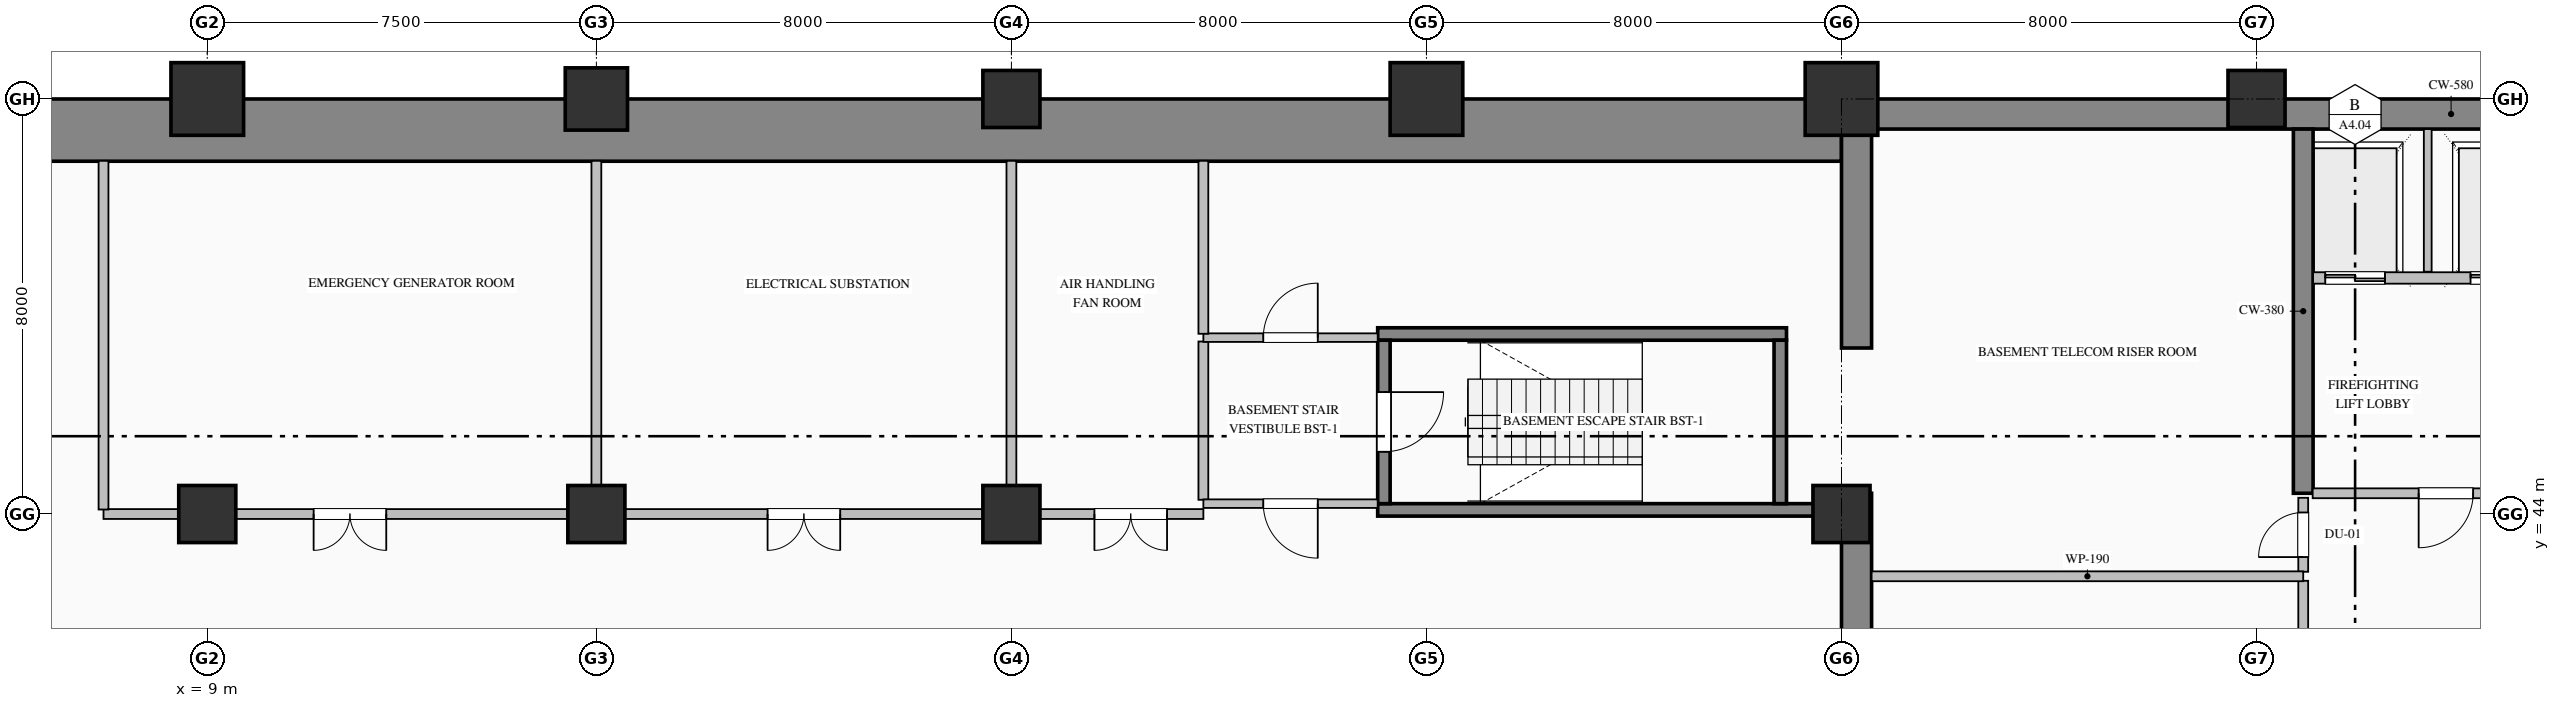
"""IFC4 building model, lengths in metres.
Left out: names, types, materials, properties, quantities, classifications, styles, units other than length and angle.
Written with IfcOpenShell. Run it as: python <this file> out.ifc"""

import sys

from ifc_helpers import new_model, si_unit, direction, frame, frame_2d, origin, origin_2d, place, context, subcontext, project, spatial, rectangle, hollow_rectangle, hollow_circle, extrude, element, fill, save


model = new_model("IFC4")
c1 = context("Model", 3, precision=1e-05, world=origin(), true_north=direction((0.0, 1.0)))
c2 = subcontext(c1, "Body", "Model", "MODEL_VIEW")
j1 = project(units=[si_unit("LENGTHUNIT", "METRE"), si_unit("PLANEANGLEUNIT", "RADIAN")], contexts=[c1])
p1 = place(None, origin())
s1 = spatial("IfcSite", under=j1, at=p1, CompositionType="ELEMENT")
p2 = place(p1, origin())
s2 = spatial("IfcBuilding", under=s1, at=p2, CompositionType="ELEMENT")
p3 = place(p2, frame((0.0, 0.0, -9.2)))
s3 = spatial("IfcBuildingStorey", under=s2, at=p3, CompositionType="ELEMENT", Elevation=-9.2)
p4 = place(p3, frame((-1.2, 51.4, 0.0), z_axis=(0.0, 0.0, 1.0), x_axis=(1.0, 0.0, 0.0)))
e1 = element("IfcWall", 1, at=p4, inside=s3, PredefinedType="USERDEFINED", context=c2, shape_type="SweptSolid", body=[
    extrude(rectangle(XDim=41.7, YDim=1.2, at=frame_2d((20.85, 0.0))), origin(), (0.0, 0.0, 1.0), 4.6),
])
p5 = place(p3, frame((40.5, 51.71, 0.0), z_axis=(0.0, 0.0, 1.0), x_axis=(1.0, 0.0, 0.0)))
e2 = element("IfcWall", 2, at=p5, inside=s3, PredefinedType="SHEAR", context=c2, shape_type="SweptSolid", body=[
    extrude(rectangle(XDim=23.5, YDim=0.58, at=frame_2d((11.75, 0.0))), origin(), (0.0, 0.0, 1.0), 4.24),
])
p6 = place(p3, frame((40.79, 36.58, 0.0), z_axis=(0.0, 0.0, 1.0), x_axis=(0.0, 1.0, 0.0)))
e3 = element("IfcWall", 3, at=p6, inside=s3, PredefinedType="SHEAR", context=c2, shape_type="SweptSolid", body=[
    extrude(rectangle(XDim=7.82, YDim=0.58, at=frame_2d((3.91, 0.0))), origin(), (0.0, 0.0, 1.0), 4.24),
])
p7 = place(p3, frame((40.79, 47.2, 0.0), z_axis=(0.0, 0.0, 1.0), x_axis=(0.0, 1.0, 0.0)))
e4 = element("IfcWall", 4, at=p7, inside=s3, PredefinedType="SHEAR", context=c2, shape_type="SweptSolid", body=[
    extrude(rectangle(XDim=4.22, YDim=0.58, at=frame_2d((2.11, 0.0))), origin(), (0.0, 0.0, 1.0), 4.24),
])
p8 = place(p3, frame((49.4, 44.4, 0.0), z_axis=(0.0, 0.0, 1.0), x_axis=(0.0, 1.0, 0.0)))
e5 = element("IfcWall", 5, at=p8, inside=s3, PredefinedType="SHEAR", context=c2, shape_type="SweptSolid", body=[
    extrude(rectangle(XDim=7.02, YDim=0.38, at=frame_2d((3.51, 0.0))), origin(), (0.0, 0.0, 1.0), 4.24),
])
p9 = place(p3, frame((9.0, 44.0, 0.0), z_axis=(0.0, 0.0, 1.0), x_axis=(1.0, 0.0, 0.0)))
e6 = element("IfcColumn", 6, at=p9, inside=s3, PredefinedType="COLUMN", context=c2, shape_type="SweptSolid", body=[
    extrude(rectangle(XDim=1.1, YDim=1.1, at=origin_2d()), origin(), (0.0, 0.0, 1.0), 4.6),
])
p10 = place(p3, frame((9.0, 52.0, 0.0), z_axis=(0.0, 0.0, 1.0), x_axis=(1.0, 0.0, 0.0)))
e7 = element("IfcColumn", 7, at=p10, inside=s3, PredefinedType="COLUMN", context=c2, shape_type="SweptSolid", body=[
    extrude(hollow_rectangle(XDim=1.4, YDim=1.4, WallThickness=0.05, at=origin_2d()), origin(), (0.0, 0.0, 1.0), 4.6),
])
p11 = place(p3, frame((16.5, 44.0, 0.0), z_axis=(0.0, 0.0, 1.0), x_axis=(1.0, 0.0, 0.0)))
e8 = element("IfcColumn", 8, at=p11, inside=s3, PredefinedType="COLUMN", context=c2, shape_type="SweptSolid", body=[
    extrude(rectangle(XDim=1.1, YDim=1.1, at=origin_2d()), origin(), (0.0, 0.0, 1.0), 4.6),
])
p12 = place(p3, frame((16.5, 52.0, 0.0), z_axis=(0.0, 0.0, 1.0), x_axis=(1.0, 0.0, 0.0)))
e9 = element("IfcColumn", 9, at=p12, inside=s3, PredefinedType="COLUMN", context=c2, shape_type="SweptSolid", body=[
    extrude(hollow_circle(Radius=0.6, WallThickness=0.04, at=origin_2d()), origin(), (0.0, 0.0, 1.0), 4.6),
])
p13 = place(p3, frame((24.5, 44.0, 0.0), z_axis=(0.0, 0.0, 1.0), x_axis=(1.0, 0.0, 0.0)))
e10 = element("IfcColumn", 10, at=p13, inside=s3, PredefinedType="COLUMN", context=c2, shape_type="SweptSolid", body=[
    extrude(rectangle(XDim=1.1, YDim=1.1, at=origin_2d()), origin(), (0.0, 0.0, 1.0), 4.6),
])
p14 = place(p3, frame((24.5, 52.0, 0.0), z_axis=(0.0, 0.0, 1.0), x_axis=(1.0, 0.0, 0.0)))
e11 = element("IfcColumn", 11, at=p14, inside=s3, PredefinedType="COLUMN", context=c2, shape_type="SweptSolid", body=[
    extrude(hollow_rectangle(XDim=1.1, YDim=1.1, WallThickness=0.04, at=origin_2d()), origin(), (0.0, 0.0, 1.0), 4.6),
])
p15 = place(p3, frame((32.5, 52.0, 0.0), z_axis=(0.0, 0.0, 1.0), x_axis=(1.0, 0.0, 0.0)))
e12 = element("IfcColumn", 12, at=p15, inside=s3, PredefinedType="COLUMN", context=c2, shape_type="SweptSolid", body=[
    extrude(hollow_rectangle(XDim=1.4, YDim=1.4, WallThickness=0.05, at=origin_2d()), origin(), (0.0, 0.0, 1.0), 4.6),
])
p16 = place(p3, frame((40.5, 44.0, 0.0), z_axis=(0.0, 0.0, 1.0), x_axis=(1.0, 0.0, 0.0)))
e13 = element("IfcColumn", 13, at=p16, inside=s3, PredefinedType="COLUMN", context=c2, shape_type="SweptSolid", body=[
    extrude(rectangle(XDim=1.1, YDim=1.1, at=origin_2d()), origin(), (0.0, 0.0, 1.0), 4.6),
])
p17 = place(p3, frame((40.5, 52.0, 0.0), z_axis=(0.0, 0.0, 1.0), x_axis=(1.0, 0.0, 0.0)))
e14 = element("IfcColumn", 14, at=p17, inside=s3, PredefinedType="COLUMN", context=c2, shape_type="SweptSolid", body=[
    extrude(hollow_rectangle(XDim=1.4, YDim=1.4, WallThickness=0.05, at=origin_2d()), origin(), (0.0, 0.0, 1.0), 4.6),
])
p18 = place(p3, frame((48.5, 52.0, 0.0), z_axis=(0.0, 0.0, 1.0), x_axis=(1.0, 0.0, 0.0)))
e15 = element("IfcColumn", 15, at=p18, inside=s3, PredefinedType="COLUMN", context=c2, shape_type="SweptSolid", body=[
    extrude(hollow_rectangle(XDim=1.1, YDim=1.1, WallThickness=0.04, at=origin_2d()), origin(), (0.0, 0.0, 1.0), 4.6),
])
p19 = place(p3, frame((31.56, 47.47, 0.0), z_axis=(0.0, 0.0, 1.0), x_axis=(1.0, 0.0, 0.0)))
e16 = element("IfcWall", 16, at=p19, inside=s3, PredefinedType="SOLIDWALL", context=c2, shape_type="SweptSolid", body=[
    extrude(rectangle(XDim=7.88, YDim=0.24, at=frame_2d((3.94, 0.0))), origin(), (0.0, 0.0, 1.0), 4.6),
])
p20 = place(p3, frame((39.97, 44.08, 0.0), z_axis=(0.0, 0.0, 1.0), x_axis=(-1.0, 0.0, 0.0)))
e17 = element("IfcWall", 17, at=p20, inside=s3, PredefinedType="SOLIDWALL", context=c2, shape_type="SweptSolid", body=[
    extrude(rectangle(XDim=8.41, YDim=0.24, at=frame_2d((4.205, 0.0))), origin(), (0.0, 0.0, 1.0), 4.6),
])
p21 = place(p3, frame((31.68, 47.35, 0.0), z_axis=(0.0, 0.0, 1.0), x_axis=(0.0, -1.0, 0.0)))
e18 = element("IfcWall", 18, at=p21, inside=s3, PredefinedType="SOLIDWALL", context=c2, shape_type="SweptSolid", body=[
    extrude(rectangle(XDim=3.15, YDim=0.24, at=frame_2d((1.575, 0.0))), origin(), (0.0, 0.0, 1.0), 4.6),
])
p22 = place(p21, frame((1.0, 0.0, 0.0)))
e19 = element("IfcOpeningElement", 19, at=p22, cuts=e18, PredefinedType="OPENING", context=c2, shape_type="SweptSolid", body=[
    extrude(rectangle(XDim=1.15, YDim=2.2, at=frame_2d((0.575, 1.1))), frame((0.0, 0.13, 0.0), z_axis=(0.0, -1.0, 0.0), x_axis=(1.0, 0.0, 0.0)), (0.0, 0.0, 1.0), 0.26),
])
p23 = place(p3, frame((39.32, 44.2, 0.0), z_axis=(0.0, 0.0, 1.0), x_axis=(0.0, 1.0, 0.0)))
e20 = element("IfcWall", 20, at=p23, inside=s3, PredefinedType="SOLIDWALL", context=c2, shape_type="SweptSolid", body=[
    extrude(rectangle(XDim=3.15, YDim=0.24, at=frame_2d((1.575, 0.0))), origin(), (0.0, 0.0, 1.0), 4.6),
])
p24 = place(p3, frame((54.71, 48.55, 0.0), z_axis=(0.0, 0.0, 1.0), x_axis=(-1.0, 0.0, 0.0)))
e21 = element("IfcWall", 21, at=p24, inside=s3, PredefinedType="PARTITIONING", context=c2, shape_type="SweptSolid", body=[
    extrude(rectangle(XDim=5.12, YDim=0.22, at=frame_2d((2.56, 0.0))), origin(), (0.0, 0.0, 1.0), 4.24),
])
p25 = place(p24, frame((3.735, 0.0, 0.0)))
e22 = element("IfcOpeningElement", 22, at=p25, cuts=e21, PredefinedType="OPENING", context=c2, shape_type="SweptSolid", body=[
    extrude(rectangle(XDim=1.15, YDim=2.2, at=frame_2d((0.575, 1.1))), frame((0.0, 0.12, 0.0), z_axis=(0.0, -1.0, 0.0), x_axis=(1.0, 0.0, 0.0)), (0.0, 0.0, 1.0), 0.24),
])
p26 = place(p24, frame((0.935, 0.0, 0.0)))
e23 = element("IfcOpeningElement", 23, at=p26, cuts=e21, PredefinedType="OPENING", context=c2, shape_type="SweptSolid", body=[
    extrude(rectangle(XDim=1.15, YDim=2.2, at=frame_2d((0.575, 1.1))), frame((0.0, 0.12, 0.0), z_axis=(0.0, -1.0, 0.0), x_axis=(1.0, 0.0, 0.0)), (0.0, 0.0, 1.0), 0.24),
])
p27 = place(p3, frame((51.8, 48.67, 0.0), z_axis=(0.0, 0.0, 1.0), x_axis=(0.0, 1.0, 0.0)))
e24 = element("IfcWall", 24, at=p27, inside=s3, PredefinedType="PARTITIONING", context=c2, shape_type="SweptSolid", body=[
    extrude(rectangle(XDim=2.75, YDim=0.15, at=frame_2d((1.375, 0.0))), origin(), (0.0, 0.0, 1.0), 4.24),
])
p28 = place(p3, frame((54.718, 44.4, 0.0), z_axis=(0.0, 0.0, 1.0), x_axis=(-1.0, 0.0, 0.0)))
e25 = element("IfcWall", 25, at=p28, inside=s3, PredefinedType="PARTITIONING", context=c2, shape_type="SweptSolid", body=[
    extrude(rectangle(XDim=5.136, YDim=0.19, at=frame_2d((2.568, 0.0))), origin(), (0.0, 0.0, 1.0), 4.24),
])
p29 = place(p28, frame((2.043, 0.0, 0.0)))
e26 = element("IfcOpeningElement", 26, at=p29, cuts=e25, PredefinedType="OPENING", context=c2, shape_type="SweptSolid", body=[
    extrude(rectangle(XDim=1.05, YDim=2.15, at=frame_2d((0.525, 1.075))), frame((0.0, 0.105, 0.0), z_axis=(0.0, -1.0, 0.0), x_axis=(1.0, 0.0, 0.0)), (0.0, 0.0, 1.0), 0.21),
])
p30 = place(p3, frame((49.4, 36.58, 0.0), z_axis=(0.0, 0.0, 1.0), x_axis=(0.0, 1.0, 0.0)))
e27 = element("IfcWall", 27, at=p30, inside=s3, PredefinedType="PARTITIONING", context=c2, shape_type="SweptSolid", body=[
    extrude(rectangle(XDim=6.133, YDim=0.19, at=frame_2d((3.066, 0.0))), origin(), (0.0, 0.0, 1.0), 3.332),
])
p31 = place(p30, frame((2.366, 0.0, 0.0)))
e28 = element("IfcOpeningElement", 28, at=p31, cuts=e27, PredefinedType="OPENING", context=c2, shape_type="SweptSolid", body=[
    extrude(rectangle(XDim=1.4, YDim=2.25, at=frame_2d((0.7, 1.125))), frame((0.0, 0.105, 0.0), z_axis=(0.0, -1.0, 0.0), x_axis=(1.0, 0.0, 0.0)), (0.0, 0.0, 1.0), 0.21),
])
p32 = place(p3, frame((49.4, 42.887, 0.0), z_axis=(0.0, 0.0, 1.0), x_axis=(0.0, 1.0, 0.0)))
e29 = element("IfcWall", 29, at=p32, inside=s3, PredefinedType="PARTITIONING", context=c2, shape_type="SweptSolid", body=[
    extrude(rectangle(XDim=1.426, YDim=0.19, at=frame_2d((0.713, 0.0))), origin(), (0.0, 0.0, 1.0), 3.332),
])
p33 = place(p32, frame((0.283, 0.0, 0.0)))
e30 = element("IfcOpeningElement", 30, at=p33, cuts=e29, PredefinedType="OPENING", context=c2, shape_type="SweptSolid", body=[
    extrude(rectangle(XDim=0.86, YDim=2.1, at=frame_2d((0.43, 1.05))), frame((0.0, 0.105, 0.0), z_axis=(0.0, -1.0, 0.0), x_axis=(1.0, 0.0, 0.0)), (0.0, 0.0, 1.0), 0.21),
])
p34 = place(p3, frame((41.08, 42.8, 0.0), z_axis=(0.0, 0.0, 1.0), x_axis=(1.0, 0.0, 0.0)))
e31 = element("IfcWall", 31, at=p34, inside=s3, PredefinedType="PARTITIONING", context=c2, shape_type="SweptSolid", body=[
    extrude(rectangle(XDim=8.32, YDim=0.19, at=frame_2d((4.16, 0.0))), origin(), (0.0, 0.0, 1.0), 4.24),
])
p35 = place(p3, frame((28.2, 44.274, 0.0), z_axis=(0.0, 0.0, 1.0), x_axis=(0.0, 1.0, 0.0)))
e32 = element("IfcWall", 32, at=p35, inside=s3, PredefinedType="PARTITIONING", context=c2, shape_type="SweptSolid", body=[
    extrude(rectangle(XDim=3.051, YDim=0.19, at=frame_2d((1.525, 0.0))), origin(), (0.0, 0.0, 1.0), 4.24),
])
p36 = place(p3, frame((31.56, 44.2, 0.0), z_axis=(0.0, 0.0, 1.0), x_axis=(-1.0, 0.0, 0.0)))
e33 = element("IfcWall", 33, at=p36, inside=s3, PredefinedType="PARTITIONING", context=c2, shape_type="SweptSolid", body=[
    extrude(rectangle(XDim=3.36, YDim=0.165, at=frame_2d((1.68, 0.0))), origin(), (0.0, 0.0, 1.0), 4.24),
])
p37 = place(p36, frame((1.155, 0.0, 0.0)))
e34 = element("IfcOpeningElement", 34, at=p37, cuts=e33, PredefinedType="OPENING", context=c2, shape_type="SweptSolid", body=[
    extrude(rectangle(XDim=1.05, YDim=2.15, at=frame_2d((0.525, 1.075))), frame((0.0, 0.093, 0.0), z_axis=(0.0, -1.0, 0.0), x_axis=(1.0, 0.0, 0.0)), (0.0, 0.0, 1.0), 0.185),
])
p38 = place(p3, frame((28.2, 47.4, 0.0), z_axis=(0.0, 0.0, 1.0), x_axis=(1.0, 0.0, 0.0)))
e35 = element("IfcWall", 35, at=p38, inside=s3, PredefinedType="PARTITIONING", context=c2, shape_type="SweptSolid", body=[
    extrude(rectangle(XDim=3.36, YDim=0.165, at=frame_2d((1.68, 0.0))), origin(), (0.0, 0.0, 1.0), 4.24),
])
p39 = place(p38, frame((1.155, 0.0, 0.0)))
e36 = element("IfcOpeningElement", 36, at=p39, cuts=e35, PredefinedType="OPENING", context=c2, shape_type="SweptSolid", body=[
    extrude(rectangle(XDim=1.05, YDim=2.15, at=frame_2d((0.525, 1.075))), frame((0.0, 0.093, 0.0), z_axis=(0.0, -1.0, 0.0), x_axis=(1.0, 0.0, 0.0)), (0.0, 0.0, 1.0), 0.185),
])
p40 = place(p3, frame((16.5, 50.808, 0.0), z_axis=(0.0, 0.0, 1.0), x_axis=(0.0, -1.0, 0.0)))
e37 = element("IfcWall", 37, at=p40, inside=s3, PredefinedType="PARTITIONING", context=c2, shape_type="SweptSolid", body=[
    extrude(rectangle(XDim=6.721, YDim=0.19, at=frame_2d((3.361, 0.0))), origin(), (0.0, 0.0, 1.0), 3.332),
])
p41 = place(p3, frame((16.5, 44.0, 0.0), z_axis=(0.0, 0.0, 1.0), x_axis=(-1.0, 0.0, 0.0)))
e38 = element("IfcWall", 38, at=p41, inside=s3, PredefinedType="PARTITIONING", context=c2, shape_type="SweptSolid", body=[
    extrude(rectangle(XDim=9.5, YDim=0.19, at=frame_2d((4.75, 0.0))), origin(), (0.0, 0.0, 1.0), 3.332),
])
p42 = place(p41, frame((4.05, 0.0, 0.0)))
e39 = element("IfcOpeningElement", 39, at=p42, cuts=e38, PredefinedType="OPENING", context=c2, shape_type="SweptSolid", body=[
    extrude(rectangle(XDim=1.4, YDim=2.25, at=frame_2d((0.7, 1.125))), frame((0.0, 0.105, 0.0), z_axis=(0.0, -1.0, 0.0), x_axis=(1.0, 0.0, 0.0)), (0.0, 0.0, 1.0), 0.21),
])
p43 = place(p3, frame((7.0, 44.087, 0.0), z_axis=(0.0, 0.0, 1.0), x_axis=(0.0, 1.0, 0.0)))
e40 = element("IfcWall", 40, at=p43, inside=s3, PredefinedType="PARTITIONING", context=c2, shape_type="SweptSolid", body=[
    extrude(rectangle(XDim=6.721, YDim=0.19, at=frame_2d((3.361, 0.0))), origin(), (0.0, 0.0, 1.0), 4.24),
])
p44 = place(p3, frame((24.5, 50.808, 0.0), z_axis=(0.0, 0.0, 1.0), x_axis=(0.0, -1.0, 0.0)))
e41 = element("IfcWall", 41, at=p44, inside=s3, PredefinedType="PARTITIONING", context=c2, shape_type="SweptSolid", body=[
    extrude(rectangle(XDim=6.721, YDim=0.19, at=frame_2d((3.361, 0.0))), origin(), (0.0, 0.0, 1.0), 3.332),
])
p45 = place(p3, frame((24.5, 44.0, 0.0), z_axis=(0.0, 0.0, 1.0), x_axis=(-1.0, 0.0, 0.0)))
e42 = element("IfcWall", 42, at=p45, inside=s3, PredefinedType="PARTITIONING", context=c2, shape_type="SweptSolid", body=[
    extrude(rectangle(XDim=8.0, YDim=0.19, at=frame_2d((4.0, 0.0))), origin(), (0.0, 0.0, 1.0), 3.332),
])
p46 = place(p45, frame((3.3, 0.0, 0.0)))
e43 = element("IfcOpeningElement", 43, at=p46, cuts=e42, PredefinedType="OPENING", context=c2, shape_type="SweptSolid", body=[
    extrude(rectangle(XDim=1.4, YDim=2.25, at=frame_2d((0.7, 1.125))), frame((0.0, 0.105, 0.0), z_axis=(0.0, -1.0, 0.0), x_axis=(1.0, 0.0, 0.0)), (0.0, 0.0, 1.0), 0.21),
])
p47 = place(p3, frame((28.2, 44.0, 0.0), z_axis=(0.0, 0.0, 1.0), x_axis=(-1.0, 0.0, 0.0)))
e44 = element("IfcWall", 44, at=p47, inside=s3, PredefinedType="PARTITIONING", context=c2, shape_type="SweptSolid", body=[
    extrude(rectangle(XDim=3.7, YDim=0.19, at=frame_2d((1.85, 0.0))), origin(), (0.0, 0.0, 1.0), 4.24),
])
p48 = place(p47, frame((0.7, 0.0, 0.0)))
e45 = element("IfcOpeningElement", 45, at=p48, cuts=e44, PredefinedType="OPENING", context=c2, shape_type="SweptSolid", body=[
    extrude(rectangle(XDim=1.4, YDim=2.25, at=frame_2d((0.7, 1.125))), frame((0.0, 0.105, 0.0), z_axis=(0.0, -1.0, 0.0), x_axis=(1.0, 0.0, 0.0)), (0.0, 0.0, 1.0), 0.21),
])
p49 = place(p3, frame((28.2, 50.808, 0.0), z_axis=(0.0, 0.0, 1.0), x_axis=(0.0, -1.0, 0.0)))
e46 = element("IfcWall", 46, at=p49, inside=s3, PredefinedType="PARTITIONING", context=c2, shape_type="SweptSolid", body=[
    extrude(rectangle(XDim=3.333, YDim=0.19, at=frame_2d((1.667, 0.0))), origin(), (0.0, 0.0, 1.0), 4.24),
])
p50 = place(p22, origin())
e47 = element("IfcDoor", 47, at=p50, inside=s3, OperationType="SINGLE_SWING_LEFT", PredefinedType="DOOR", context=c2, shape_type="SweptSolid", body=[
    extrude(rectangle(XDim=1.15, YDim=2.2, at=frame_2d((0.575, 1.1))), frame((0.0, 0.025, 0.0), z_axis=(0.0, -1.0, 0.0), x_axis=(1.0, 0.0, 0.0)), (0.0, 0.0, 1.0), 0.05),
])
fill(e19, e47)
p51 = place(p25, origin())
e48 = element("IfcDoor", 48, at=p51, inside=s3, OperationType="DOUBLE_DOOR_SLIDING", PredefinedType="DOOR", context=c2, shape_type="SweptSolid", body=[
    extrude(rectangle(XDim=1.15, YDim=2.2, at=frame_2d((0.575, 1.1))), frame((0.0, 0.025, 0.0), z_axis=(0.0, -1.0, 0.0), x_axis=(1.0, 0.0, 0.0)), (0.0, 0.0, 1.0), 0.05),
])
fill(e22, e48)
p52 = place(p26, origin())
e49 = element("IfcDoor", 49, at=p52, inside=s3, OperationType="DOUBLE_DOOR_SLIDING", PredefinedType="DOOR", context=c2, shape_type="SweptSolid", body=[
    extrude(rectangle(XDim=1.15, YDim=2.2, at=frame_2d((0.575, 1.1))), frame((0.0, 0.025, 0.0), z_axis=(0.0, -1.0, 0.0), x_axis=(1.0, 0.0, 0.0)), (0.0, 0.0, 1.0), 0.05),
])
fill(e23, e49)
p53 = place(p29, origin())
e50 = element("IfcDoor", 50, at=p53, inside=s3, OperationType="SINGLE_SWING_RIGHT", PredefinedType="DOOR", context=c2, shape_type="SweptSolid", body=[
    extrude(rectangle(XDim=1.05, YDim=2.15, at=frame_2d((0.525, 1.075))), frame((0.0, 0.025, 0.0), z_axis=(0.0, -1.0, 0.0), x_axis=(1.0, 0.0, 0.0)), (0.0, 0.0, 1.0), 0.05),
])
fill(e26, e50)
p54 = place(p37, origin())
e51 = element("IfcDoor", 51, at=p54, inside=s3, OperationType="SINGLE_SWING_LEFT", PredefinedType="DOOR", context=c2, shape_type="SweptSolid", body=[
    extrude(rectangle(XDim=1.05, YDim=2.15, at=frame_2d((0.525, 1.075))), frame((0.0, 0.025, 0.0), z_axis=(0.0, -1.0, 0.0), x_axis=(1.0, 0.0, 0.0)), (0.0, 0.0, 1.0), 0.05),
])
fill(e34, e51)
p55 = place(p39, origin())
e52 = element("IfcDoor", 52, at=p55, inside=s3, OperationType="SINGLE_SWING_RIGHT", PredefinedType="DOOR", context=c2, shape_type="SweptSolid", body=[
    extrude(rectangle(XDim=1.05, YDim=2.15, at=frame_2d((0.525, 1.075))), frame((0.0, 0.025, 0.0), z_axis=(0.0, -1.0, 0.0), x_axis=(1.0, 0.0, 0.0)), (0.0, 0.0, 1.0), 0.05),
])
fill(e36, e52)
p56 = place(p33, origin())
e53 = element("IfcDoor", 53, at=p56, inside=s3, OperationType="SINGLE_SWING_LEFT", PredefinedType="DOOR", context=c2, shape_type="SweptSolid", body=[
    extrude(rectangle(XDim=0.86, YDim=2.1, at=frame_2d((0.43, 1.05))), frame((0.0, 0.025, 0.0), z_axis=(0.0, -1.0, 0.0), x_axis=(1.0, 0.0, 0.0)), (0.0, 0.0, 1.0), 0.05),
])
fill(e30, e53)
p57 = place(p42, origin())
e54 = element("IfcDoor", 54, at=p57, inside=s3, OperationType="DOUBLE_DOOR_SINGLE_SWING", PredefinedType="DOOR", context=c2, shape_type="SweptSolid", body=[
    extrude(rectangle(XDim=1.4, YDim=2.25, at=frame_2d((0.7, 1.125))), frame((0.0, 0.025, 0.0), z_axis=(0.0, -1.0, 0.0), x_axis=(1.0, 0.0, 0.0)), (0.0, 0.0, 1.0), 0.05),
])
fill(e39, e54)
p58 = place(p46, origin())
e55 = element("IfcDoor", 55, at=p58, inside=s3, OperationType="DOUBLE_DOOR_SINGLE_SWING", PredefinedType="DOOR", context=c2, shape_type="SweptSolid", body=[
    extrude(rectangle(XDim=1.4, YDim=2.25, at=frame_2d((0.7, 1.125))), frame((0.0, 0.025, 0.0), z_axis=(0.0, -1.0, 0.0), x_axis=(1.0, 0.0, 0.0)), (0.0, 0.0, 1.0), 0.05),
])
fill(e43, e55)
p59 = place(p48, origin())
e56 = element("IfcDoor", 56, at=p59, inside=s3, OperationType="DOUBLE_DOOR_SINGLE_SWING", PredefinedType="DOOR", context=c2, shape_type="SweptSolid", body=[
    extrude(rectangle(XDim=1.4, YDim=2.25, at=frame_2d((0.7, 1.125))), frame((0.0, 0.025, 0.0), z_axis=(0.0, -1.0, 0.0), x_axis=(1.0, 0.0, 0.0)), (0.0, 0.0, 1.0), 0.05),
])
fill(e45, e56)
save(model, sys.argv[1])
